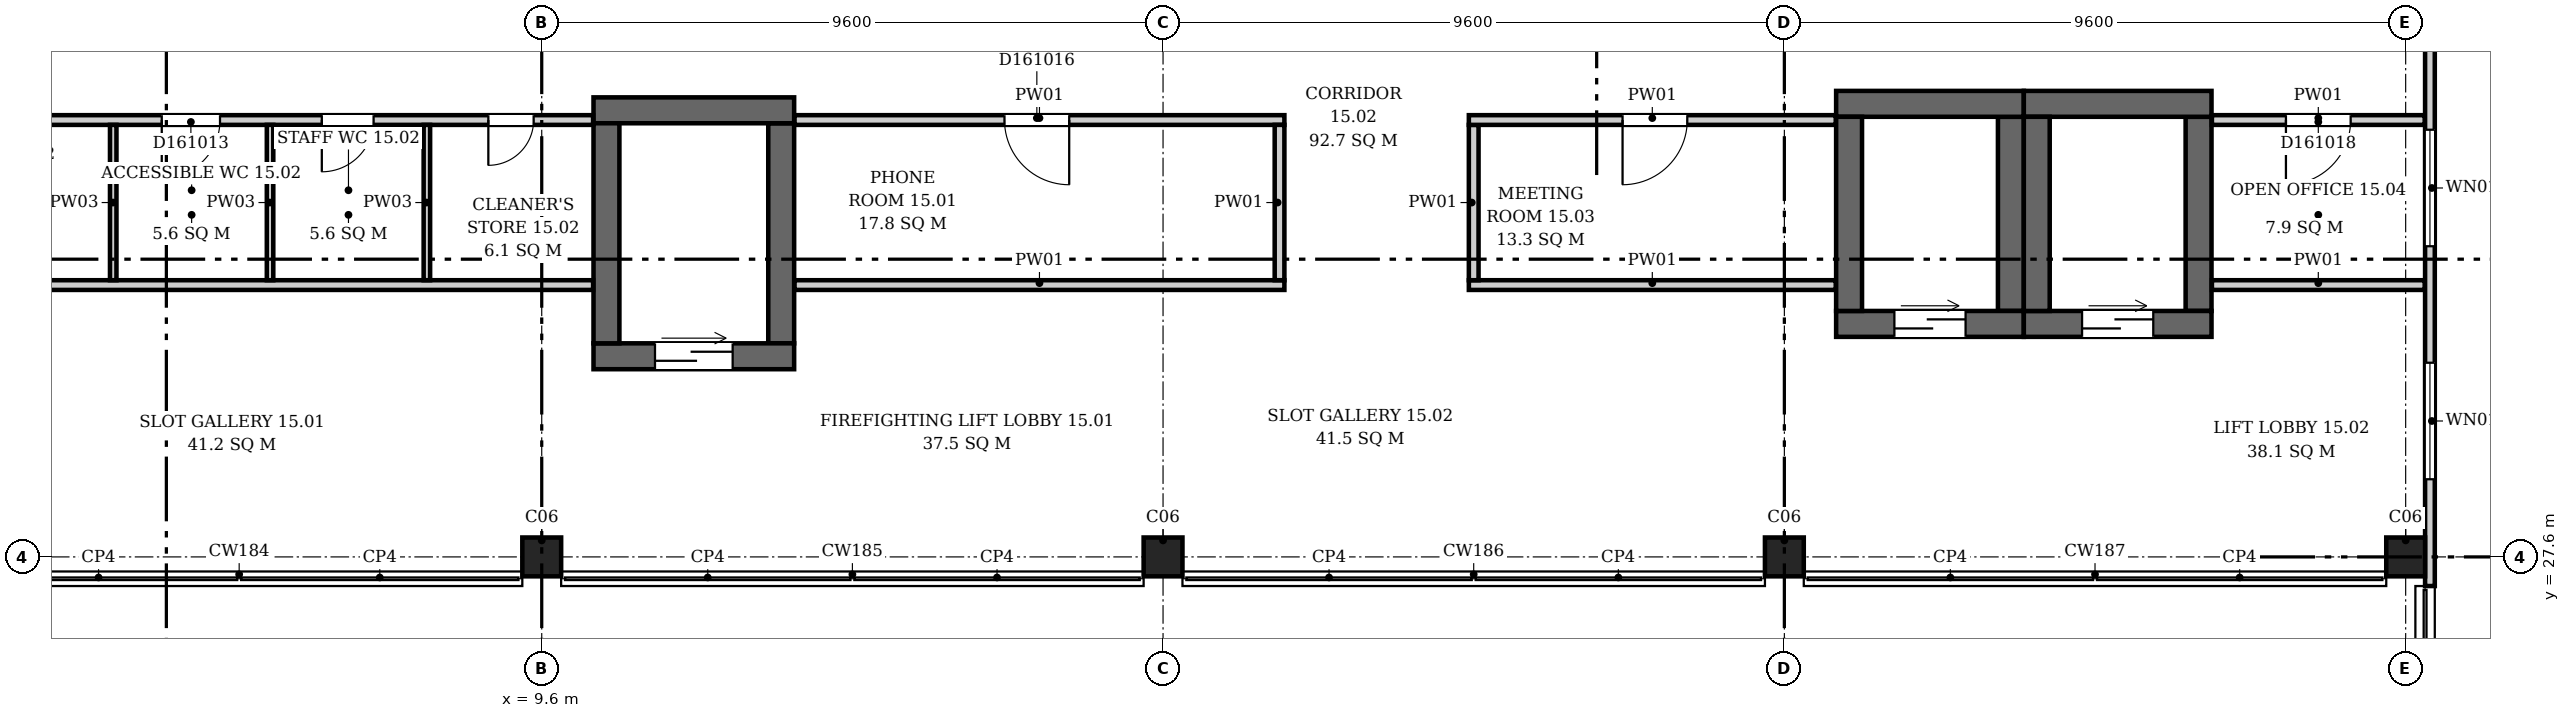
"""IFC4 building model, lengths in metres.
Left out: names, types, materials, properties, quantities, classifications, styles, units other than length and angle.
Written with IfcOpenShell. Run it as: python <this file> out.ifc"""

import sys

from ifc_helpers import new_model, si_unit, direction, frame, frame_2d, origin, origin_2d, place, context, subcontext, project, spatial, rectangle, extrude, element, fill, save


model = new_model("IFC4")
c1 = context("Model", 3, precision=1e-05, world=origin(), true_north=direction((0.0, 1.0)))
c2 = subcontext(c1, "Body", "Model", "MODEL_VIEW")
j1 = project(units=[si_unit("LENGTHUNIT", "METRE"), si_unit("PLANEANGLEUNIT", "RADIAN")], contexts=[c1])
p1 = place(None, origin())
s1 = spatial("IfcSite", under=j1, at=p1, CompositionType="ELEMENT")
p2 = place(p1, origin())
s2 = spatial("IfcBuilding", under=s1, at=p2, CompositionType="ELEMENT")
p3 = place(p2, frame((0.0, 0.0, 73.9)))
s3 = spatial("IfcBuildingStorey", under=s2, at=p3, CompositionType="ELEMENT", Elevation=73.9)
p4 = place(p3, frame((10.4, 30.7, 0.0), z_axis=(0.0, 0.0, 1.0), x_axis=(1.0, 0.0, 0.0)))
e1 = element("IfcWall", 1, at=p4, inside=s3, PredefinedType="SHEAR", context=c2, shape_type="SweptSolid", body=[
    extrude(rectangle(XDim=3.1, YDim=0.4, at=frame_2d((1.55, 0.0))), origin(), (0.0, 0.0, 1.0), 4.2),
])
p5 = place(p4, frame((0.95, 0.0, 0.0)))
e2 = element("IfcOpeningElement", 2, at=p5, cuts=e1, PredefinedType="OPENING", context=c2, shape_type="SweptSolid", body=[
    extrude(rectangle(XDim=1.2, YDim=2.1, at=frame_2d((0.6, 1.05))), frame((0.0, 0.21, 0.0), z_axis=(0.0, -1.0, 0.0), x_axis=(1.0, 0.0, 0.0)), (0.0, 0.0, 1.0), 0.42),
])
p6 = place(p3, frame((10.4, 34.5, 0.0), z_axis=(0.0, 0.0, 1.0), x_axis=(1.0, 0.0, 0.0)))
e3 = element("IfcWall", 3, at=p6, inside=s3, PredefinedType="SHEAR", context=c2, shape_type="SweptSolid", body=[
    extrude(rectangle(XDim=3.1, YDim=0.4, at=frame_2d((1.55, 0.0))), origin(), (0.0, 0.0, 1.0), 4.2),
])
for number, where, z_axis, x_axis in (
    (4, (10.6, 30.9, 0.0), (0.0, 0.0, 1.0), (0.0, 1.0, 0.0)),
    (5, (13.3, 30.9, 0.0), (0.0, 0.0, 1.0), (0.0, 1.0, 0.0)),
):
    element("IfcWall", number, at=place(p3, frame(where, z_axis=z_axis, x_axis=x_axis)), inside=s3, PredefinedType="SHEAR", context=c2, shape_type="SweptSolid", body=[
        extrude(rectangle(XDim=3.4, YDim=0.4, at=frame_2d((1.7, 0.0))), origin(), (0.0, 0.0, 1.0), 4.2),
    ])
p7 = place(p3, frame((29.6, 31.2, 0.0), z_axis=(0.0, 0.0, 1.0), x_axis=(1.0, 0.0, 0.0)))
e6 = element("IfcWall", 6, at=p7, inside=s3, PredefinedType="SHEAR", context=c2, shape_type="SweptSolid", body=[
    extrude(rectangle(XDim=2.9, YDim=0.4, at=frame_2d((1.45, 0.0))), origin(), (0.0, 0.0, 1.0), 4.2),
])
p8 = place(p7, frame((0.9, 0.0, 0.0)))
e7 = element("IfcOpeningElement", 7, at=p8, cuts=e6, PredefinedType="OPENING", context=c2, shape_type="SweptSolid", body=[
    extrude(rectangle(XDim=1.1, YDim=2.1, at=frame_2d((0.55, 1.05))), frame((0.0, 0.21, 0.0), z_axis=(0.0, -1.0, 0.0), x_axis=(1.0, 0.0, 0.0)), (0.0, 0.0, 1.0), 0.42),
])
p9 = place(p3, frame((29.6, 34.6, 0.0), z_axis=(0.0, 0.0, 1.0), x_axis=(1.0, 0.0, 0.0)))
e8 = element("IfcWall", 8, at=p9, inside=s3, PredefinedType="SHEAR", context=c2, shape_type="SweptSolid", body=[
    extrude(rectangle(XDim=2.9, YDim=0.4, at=frame_2d((1.45, 0.0))), origin(), (0.0, 0.0, 1.0), 4.2),
])
for number, where, z_axis, x_axis in (
    (9, (29.8, 31.4, 0.0), (0.0, 0.0, 1.0), (0.0, 1.0, 0.0)),
    (10, (32.3, 31.4, 0.0), (0.0, 0.0, 1.0), (0.0, 1.0, 0.0)),
):
    element("IfcWall", number, at=place(p3, frame(where, z_axis=z_axis, x_axis=x_axis)), inside=s3, PredefinedType="SHEAR", context=c2, shape_type="SweptSolid", body=[
        extrude(rectangle(XDim=3.0, YDim=0.4, at=frame_2d((1.5, 0.0))), origin(), (0.0, 0.0, 1.0), 4.2),
    ])
p10 = place(p3, frame((32.5, 31.2, 0.0), z_axis=(0.0, 0.0, 1.0), x_axis=(1.0, 0.0, 0.0)))
e11 = element("IfcWall", 11, at=p10, inside=s3, PredefinedType="SHEAR", context=c2, shape_type="SweptSolid", body=[
    extrude(rectangle(XDim=2.9, YDim=0.4, at=frame_2d((1.45, 0.0))), origin(), (0.0, 0.0, 1.0), 4.2),
])
p11 = place(p10, frame((0.9, 0.0, 0.0)))
e12 = element("IfcOpeningElement", 12, at=p11, cuts=e11, PredefinedType="OPENING", context=c2, shape_type="SweptSolid", body=[
    extrude(rectangle(XDim=1.1, YDim=2.1, at=frame_2d((0.55, 1.05))), frame((0.0, 0.21, 0.0), z_axis=(0.0, -1.0, 0.0), x_axis=(1.0, 0.0, 0.0)), (0.0, 0.0, 1.0), 0.42),
])
p12 = place(p3, frame((32.5, 34.6, 0.0), z_axis=(0.0, 0.0, 1.0), x_axis=(1.0, 0.0, 0.0)))
e13 = element("IfcWall", 13, at=p12, inside=s3, PredefinedType="SHEAR", context=c2, shape_type="SweptSolid", body=[
    extrude(rectangle(XDim=2.9, YDim=0.4, at=frame_2d((1.45, 0.0))), origin(), (0.0, 0.0, 1.0), 4.2),
])
for number, where, z_axis, x_axis in (
    (14, (32.7, 31.4, 0.0), (0.0, 0.0, 1.0), (0.0, 1.0, 0.0)),
    (15, (35.2, 31.4, 0.0), (0.0, 0.0, 1.0), (0.0, 1.0, 0.0)),
):
    element("IfcWall", number, at=place(p3, frame(where, z_axis=z_axis, x_axis=x_axis)), inside=s3, PredefinedType="SHEAR", context=c2, shape_type="SweptSolid", body=[
        extrude(rectangle(XDim=3.0, YDim=0.4, at=frame_2d((1.5, 0.0))), origin(), (0.0, 0.0, 1.0), 4.2),
    ])
for number, where, z_axis, x_axis in (
    (16, (9.6, 27.6, 0.0), (0.0, 0.0, 1.0), (1.0, 0.0, 0.0)),
    (17, (19.2, 27.6, 0.0), (0.0, 0.0, 1.0), (1.0, 0.0, 0.0)),
    (18, (28.8, 27.6, 0.0), (0.0, 0.0, 1.0), (1.0, 0.0, 0.0)),
    (19, (38.4, 27.6, 0.0), (0.0, 0.0, 1.0), (1.0, 0.0, 0.0)),
):
    element("IfcColumn", number, at=place(p3, frame(where, z_axis=z_axis, x_axis=x_axis)), inside=s3, PredefinedType="COLUMN", context=c2, shape_type="SweptSolid", body=[
        extrude(rectangle(XDim=0.6, YDim=0.6, at=origin_2d()), origin(), (0.0, 0.0, 1.0), 4.2),
    ])
p13 = place(p3, frame((38.775, 27.15, 0.0), z_axis=(0.0, 0.0, 1.0), x_axis=(0.0, 1.0, 0.0)))
e20 = element("IfcWall", 20, at=p13, inside=s3, PredefinedType="ELEMENTEDWALL", context=c2, shape_type="SweptSolid", body=[
    extrude(rectangle(XDim=19.3, YDim=0.15, at=frame_2d((9.65, 0.0))), origin(), (0.0, 0.0, 1.0), 3.9),
])
p14 = place(p13, frame((1.65, 0.0, 0.9)))
e21 = element("IfcOpeningElement", 21, at=p14, cuts=e20, PredefinedType="OPENING", context=c2, shape_type="SweptSolid", body=[
    extrude(rectangle(XDim=1.8, YDim=2.6, at=frame_2d((0.9, 1.3))), frame((0.0, 0.085, 0.0), z_axis=(0.0, -1.0, 0.0), x_axis=(1.0, 0.0, 0.0)), (0.0, 0.0, 1.0), 0.17),
])
p15 = place(p13, frame((5.25, 0.0, 0.9)))
e22 = element("IfcOpeningElement", 22, at=p15, cuts=e20, PredefinedType="OPENING", context=c2, shape_type="SweptSolid", body=[
    extrude(rectangle(XDim=1.8, YDim=2.6, at=frame_2d((0.9, 1.3))), frame((0.0, 0.085, 0.0), z_axis=(0.0, -1.0, 0.0), x_axis=(1.0, 0.0, 0.0)), (0.0, 0.0, 1.0), 0.17),
])
p16 = place(p13, frame((8.85, 0.0, 0.9)))
e23 = element("IfcOpeningElement", 23, at=p16, cuts=e20, PredefinedType="OPENING", context=c2, shape_type="SweptSolid", body=[
    extrude(rectangle(XDim=1.8, YDim=2.6, at=frame_2d((0.9, 1.3))), frame((0.0, 0.085, 0.0), z_axis=(0.0, -1.0, 0.0), x_axis=(1.0, 0.0, 0.0)), (0.0, 0.0, 1.0), 0.17),
])
p17 = place(p13, frame((12.45, 0.0, 0.9)))
e24 = element("IfcOpeningElement", 24, at=p17, cuts=e20, PredefinedType="OPENING", context=c2, shape_type="SweptSolid", body=[
    extrude(rectangle(XDim=1.8, YDim=2.6, at=frame_2d((0.9, 1.3))), frame((0.0, 0.085, 0.0), z_axis=(0.0, -1.0, 0.0), x_axis=(1.0, 0.0, 0.0)), (0.0, 0.0, 1.0), 0.17),
])
p18 = place(p13, frame((16.05, 0.0, 0.9)))
e25 = element("IfcOpeningElement", 25, at=p18, cuts=e20, PredefinedType="OPENING", context=c2, shape_type="SweptSolid", body=[
    extrude(rectangle(XDim=1.8, YDim=2.6, at=frame_2d((0.9, 1.3))), frame((0.0, 0.085, 0.0), z_axis=(0.0, -1.0, 0.0), x_axis=(1.0, 0.0, 0.0)), (0.0, 0.0, 1.0), 0.17),
])
p19 = place(p3, frame((-0.044, 31.8, 0.0), z_axis=(0.0, 0.0, 1.0), x_axis=(1.0, 0.0, 0.0)))
e26 = element("IfcWall", 26, at=p19, inside=s3, PredefinedType="PARTITIONING", context=c2, shape_type="SweptSolid", body=[
    extrude(rectangle(XDim=10.438, YDim=0.15, at=frame_2d((5.219, 0.0))), origin(), (0.0, 0.0, 1.0), 3.9),
])
p20 = place(p3, frame((-0.044, 34.35, 0.0), z_axis=(0.0, 0.0, 1.0), x_axis=(1.0, 0.0, 0.0)))
e27 = element("IfcWall", 27, at=p20, inside=s3, PredefinedType="PARTITIONING", context=c2, shape_type="SweptSolid", body=[
    extrude(rectangle(XDim=10.438, YDim=0.15, at=frame_2d((5.219, 0.0))), origin(), (0.0, 0.0, 1.0), 3.9),
])
p21 = place(p20, frame((1.094, 0.0, 0.0)))
e28 = element("IfcOpeningElement", 28, at=p21, cuts=e27, PredefinedType="OPENING", context=c2, shape_type="SweptSolid", body=[
    extrude(rectangle(XDim=0.8, YDim=2.1, at=frame_2d((0.4, 1.05))), frame((0.0, 0.085, 0.0), z_axis=(0.0, -1.0, 0.0), x_axis=(1.0, 0.0, 0.0)), (0.0, 0.0, 1.0), 0.17),
])
p22 = place(p20, frame((3.773, 0.0, 0.0)))
e29 = element("IfcOpeningElement", 29, at=p22, cuts=e27, PredefinedType="OPENING", context=c2, shape_type="SweptSolid", body=[
    extrude(rectangle(XDim=0.9, YDim=2.1, at=frame_2d((0.45, 1.05))), frame((0.0, 0.085, 0.0), z_axis=(0.0, -1.0, 0.0), x_axis=(1.0, 0.0, 0.0)), (0.0, 0.0, 1.0), 0.17),
])
p23 = place(p20, frame((6.246, 0.0, 0.0)))
e30 = element("IfcOpeningElement", 30, at=p23, cuts=e27, PredefinedType="OPENING", context=c2, shape_type="SweptSolid", body=[
    extrude(rectangle(XDim=0.8, YDim=2.1, at=frame_2d((0.4, 1.05))), frame((0.0, 0.085, 0.0), z_axis=(0.0, -1.0, 0.0), x_axis=(1.0, 0.0, 0.0)), (0.0, 0.0, 1.0), 0.17),
])
p24 = place(p20, frame((8.819, 0.0, 0.0)))
e31 = element("IfcOpeningElement", 31, at=p24, cuts=e27, PredefinedType="OPENING", context=c2, shape_type="SweptSolid", body=[
    extrude(rectangle(XDim=0.7, YDim=2.1, at=frame_2d((0.35, 1.05))), frame((0.0, 0.085, 0.0), z_axis=(0.0, -1.0, 0.0), x_axis=(1.0, 0.0, 0.0)), (0.0, 0.0, 1.0), 0.17),
])
for number, where, z_axis, x_axis in (
    (32, (2.979, 31.875, 0.0), (0.0, 0.0, 1.0), (0.0, 1.0, 0.0)),
    (33, (5.402, 31.875, 0.0), (0.0, 0.0, 1.0), (0.0, 1.0, 0.0)),
    (34, (7.825, 31.875, 0.0), (0.0, 0.0, 1.0), (0.0, 1.0, 0.0)),
):
    element("IfcWall", number, at=place(p3, frame(where, z_axis=z_axis, x_axis=x_axis)), inside=s3, PredefinedType="PARTITIONING", context=c2, shape_type="SweptSolid", body=[
        extrude(rectangle(XDim=2.4, YDim=0.1, at=frame_2d((1.2, 0.0))), origin(), (0.0, 0.0, 1.0), 3.9),
    ])
p25 = place(p3, frame((13.506, 31.8, 0.0), z_axis=(0.0, 0.0, 1.0), x_axis=(1.0, 0.0, 0.0)))
e35 = element("IfcWall", 35, at=p25, inside=s3, PredefinedType="PARTITIONING", context=c2, shape_type="SweptSolid", body=[
    extrude(rectangle(XDim=7.569, YDim=0.15, at=frame_2d((3.784, 0.0))), origin(), (0.0, 0.0, 1.0), 3.9),
])
p26 = place(p3, frame((13.506, 34.35, 0.0), z_axis=(0.0, 0.0, 1.0), x_axis=(1.0, 0.0, 0.0)))
e36 = element("IfcWall", 36, at=p26, inside=s3, PredefinedType="PARTITIONING", context=c2, shape_type="SweptSolid", body=[
    extrude(rectangle(XDim=7.569, YDim=0.15, at=frame_2d((3.784, 0.0))), origin(), (0.0, 0.0, 1.0), 3.9),
])
p27 = place(p26, frame((3.244, 0.0, 0.0)))
e37 = element("IfcOpeningElement", 37, at=p27, cuts=e36, PredefinedType="OPENING", context=c2, shape_type="SweptSolid", body=[
    extrude(rectangle(XDim=1.0, YDim=2.1, at=frame_2d((0.5, 1.05))), frame((0.0, 0.085, 0.0), z_axis=(0.0, -1.0, 0.0), x_axis=(1.0, 0.0, 0.0)), (0.0, 0.0, 1.0), 0.17),
])
p28 = place(p3, frame((21.0, 31.875, 0.0), z_axis=(0.0, 0.0, 1.0), x_axis=(0.0, 1.0, 0.0)))
e38 = element("IfcWall", 38, at=p28, inside=s3, PredefinedType="PARTITIONING", context=c2, shape_type="SweptSolid", body=[
    extrude(rectangle(XDim=2.4, YDim=0.15, at=frame_2d((1.2, 0.0))), origin(), (0.0, 0.0, 1.0), 3.9),
])
p29 = place(p3, frame((23.925, 31.8, 0.0), z_axis=(0.0, 0.0, 1.0), x_axis=(1.0, 0.0, 0.0)))
e39 = element("IfcWall", 39, at=p29, inside=s3, PredefinedType="PARTITIONING", context=c2, shape_type="SweptSolid", body=[
    extrude(rectangle(XDim=5.669, YDim=0.15, at=frame_2d((2.834, 0.0))), origin(), (0.0, 0.0, 1.0), 3.9),
])
p30 = place(p3, frame((24.0, 31.875, 0.0), z_axis=(0.0, 0.0, 1.0), x_axis=(0.0, 1.0, 0.0)))
e40 = element("IfcWall", 40, at=p30, inside=s3, PredefinedType="PARTITIONING", context=c2, shape_type="SweptSolid", body=[
    extrude(rectangle(XDim=2.4, YDim=0.15, at=frame_2d((1.2, 0.0))), origin(), (0.0, 0.0, 1.0), 3.9),
])
p31 = place(p3, frame((23.925, 34.35, 0.0), z_axis=(0.0, 0.0, 1.0), x_axis=(1.0, 0.0, 0.0)))
e41 = element("IfcWall", 41, at=p31, inside=s3, PredefinedType="PARTITIONING", context=c2, shape_type="SweptSolid", body=[
    extrude(rectangle(XDim=5.669, YDim=0.15, at=frame_2d((2.834, 0.0))), origin(), (0.0, 0.0, 1.0), 3.9),
])
p32 = place(p31, frame((2.375, 0.0, 0.0)))
e42 = element("IfcOpeningElement", 42, at=p32, cuts=e41, PredefinedType="OPENING", context=c2, shape_type="SweptSolid", body=[
    extrude(rectangle(XDim=1.0, YDim=2.1, at=frame_2d((0.5, 1.05))), frame((0.0, 0.085, 0.0), z_axis=(0.0, -1.0, 0.0), x_axis=(1.0, 0.0, 0.0)), (0.0, 0.0, 1.0), 0.17),
])
p33 = place(p3, frame((35.406, 31.8, 0.0), z_axis=(0.0, 0.0, 1.0), x_axis=(1.0, 0.0, 0.0)))
e43 = element("IfcWall", 43, at=p33, inside=s3, PredefinedType="PARTITIONING", context=c2, shape_type="SweptSolid", body=[
    extrude(rectangle(XDim=3.288, YDim=0.15, at=frame_2d((1.644, 0.0))), origin(), (0.0, 0.0, 1.0), 3.9),
])
p34 = place(p3, frame((35.406, 34.35, 0.0), z_axis=(0.0, 0.0, 1.0), x_axis=(1.0, 0.0, 0.0)))
e44 = element("IfcWall", 44, at=p34, inside=s3, PredefinedType="PARTITIONING", context=c2, shape_type="SweptSolid", body=[
    extrude(rectangle(XDim=3.288, YDim=0.15, at=frame_2d((1.644, 0.0))), origin(), (0.0, 0.0, 1.0), 3.9),
])
p35 = place(p34, frame((1.144, 0.0, 0.0)))
e45 = element("IfcOpeningElement", 45, at=p35, cuts=e44, PredefinedType="OPENING", context=c2, shape_type="SweptSolid", body=[
    extrude(rectangle(XDim=1.0, YDim=2.1, at=frame_2d((0.5, 1.05))), frame((0.0, 0.085, 0.0), z_axis=(0.0, -1.0, 0.0), x_axis=(1.0, 0.0, 0.0)), (0.0, 0.0, 1.0), 0.17),
])
p36 = place(p14, origin())
e46 = element("IfcWindow", 46, at=p36, inside=s3, PartitioningType="SINGLE_PANEL", PredefinedType="WINDOW", context=c2, shape_type="SweptSolid", body=[
    extrude(rectangle(XDim=1.8, YDim=2.6, at=frame_2d((0.9, 1.3))), frame((0.0, 0.03, 0.0), z_axis=(0.0, -1.0, 0.0), x_axis=(1.0, 0.0, 0.0)), (0.0, 0.0, 1.0), 0.06),
])
fill(e21, e46)
p37 = place(p15, origin())
e47 = element("IfcWindow", 47, at=p37, inside=s3, PartitioningType="SINGLE_PANEL", PredefinedType="WINDOW", context=c2, shape_type="SweptSolid", body=[
    extrude(rectangle(XDim=1.8, YDim=2.6, at=frame_2d((0.9, 1.3))), frame((0.0, 0.03, 0.0), z_axis=(0.0, -1.0, 0.0), x_axis=(1.0, 0.0, 0.0)), (0.0, 0.0, 1.0), 0.06),
])
fill(e22, e47)
p38 = place(p5, origin())
e48 = element("IfcDoor", 48, at=p38, inside=s3, OperationType="DOUBLE_DOOR_SLIDING", PredefinedType="DOOR", context=c2, shape_type="SweptSolid", body=[
    extrude(rectangle(XDim=1.2, YDim=2.1, at=frame_2d((0.6, 1.05))), frame((0.0, 0.025, 0.0), z_axis=(0.0, -1.0, 0.0), x_axis=(1.0, 0.0, 0.0)), (0.0, 0.0, 1.0), 0.05),
])
fill(e2, e48)
p39 = place(p8, origin())
e49 = element("IfcDoor", 49, at=p39, inside=s3, OperationType="DOUBLE_DOOR_SLIDING", PredefinedType="DOOR", context=c2, shape_type="SweptSolid", body=[
    extrude(rectangle(XDim=1.1, YDim=2.1, at=frame_2d((0.55, 1.05))), frame((0.0, 0.025, 0.0), z_axis=(0.0, -1.0, 0.0), x_axis=(1.0, 0.0, 0.0)), (0.0, 0.0, 1.0), 0.05),
])
fill(e7, e49)
p40 = place(p11, origin())
e50 = element("IfcDoor", 50, at=p40, inside=s3, OperationType="DOUBLE_DOOR_SLIDING", PredefinedType="DOOR", context=c2, shape_type="SweptSolid", body=[
    extrude(rectangle(XDim=1.1, YDim=2.1, at=frame_2d((0.55, 1.05))), frame((0.0, 0.025, 0.0), z_axis=(0.0, -1.0, 0.0), x_axis=(1.0, 0.0, 0.0)), (0.0, 0.0, 1.0), 0.05),
])
fill(e12, e50)
p41 = place(p22, origin())
e51 = element("IfcDoor", 51, at=p41, inside=s3, OperationType="SINGLE_SWING_LEFT", PredefinedType="DOOR", context=c2, shape_type="SweptSolid", body=[
    extrude(rectangle(XDim=0.9, YDim=2.1, at=frame_2d((0.45, 1.05))), frame((0.0, 0.025, 0.0), z_axis=(0.0, -1.0, 0.0), x_axis=(1.0, 0.0, 0.0)), (0.0, 0.0, 1.0), 0.05),
])
fill(e29, e51)
p42 = place(p23, origin())
e52 = element("IfcDoor", 52, at=p42, inside=s3, OperationType="SINGLE_SWING_LEFT", PredefinedType="DOOR", context=c2, shape_type="SweptSolid", body=[
    extrude(rectangle(XDim=0.8, YDim=2.1, at=frame_2d((0.4, 1.05))), frame((0.0, 0.025, 0.0), z_axis=(0.0, -1.0, 0.0), x_axis=(1.0, 0.0, 0.0)), (0.0, 0.0, 1.0), 0.05),
])
fill(e30, e52)
p43 = place(p24, origin())
e53 = element("IfcDoor", 53, at=p43, inside=s3, OperationType="SINGLE_SWING_LEFT", PredefinedType="DOOR", context=c2, shape_type="SweptSolid", body=[
    extrude(rectangle(XDim=0.7, YDim=2.1, at=frame_2d((0.35, 1.05))), frame((0.0, 0.025, 0.0), z_axis=(0.0, -1.0, 0.0), x_axis=(1.0, 0.0, 0.0)), (0.0, 0.0, 1.0), 0.05),
])
fill(e31, e53)
p44 = place(p27, origin())
e54 = element("IfcDoor", 54, at=p44, inside=s3, OperationType="SINGLE_SWING_RIGHT", PredefinedType="DOOR", context=c2, shape_type="SweptSolid", body=[
    extrude(rectangle(XDim=1.0, YDim=2.1, at=frame_2d((0.5, 1.05))), frame((0.0, 0.025, 0.0), z_axis=(0.0, -1.0, 0.0), x_axis=(1.0, 0.0, 0.0)), (0.0, 0.0, 1.0), 0.05),
])
fill(e37, e54)
p45 = place(p32, origin())
e55 = element("IfcDoor", 55, at=p45, inside=s3, OperationType="SINGLE_SWING_LEFT", PredefinedType="DOOR", context=c2, shape_type="SweptSolid", body=[
    extrude(rectangle(XDim=1.0, YDim=2.1, at=frame_2d((0.5, 1.05))), frame((0.0, 0.025, 0.0), z_axis=(0.0, -1.0, 0.0), x_axis=(1.0, 0.0, 0.0)), (0.0, 0.0, 1.0), 0.05),
])
fill(e42, e55)
p46 = place(p35, origin())
e56 = element("IfcDoor", 56, at=p46, inside=s3, OperationType="SINGLE_SWING_LEFT", PredefinedType="DOOR", context=c2, shape_type="SweptSolid", body=[
    extrude(rectangle(XDim=1.0, YDim=2.1, at=frame_2d((0.5, 1.05))), frame((0.0, 0.025, 0.0), z_axis=(0.0, -1.0, 0.0), x_axis=(1.0, 0.0, 0.0)), (0.0, 0.0, 1.0), 0.05),
])
fill(e45, e56)
save(model, sys.argv[1])
